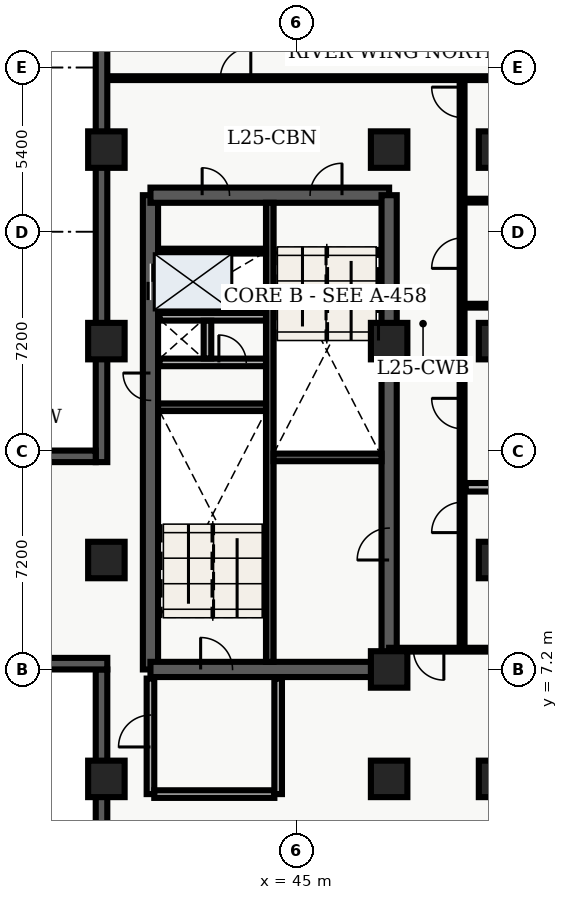
"""IFC4 building model, lengths in metres.
Left out: names, types, materials, properties, quantities, classifications, styles, units other than length and angle.
Written with IfcOpenShell. Run it as: python <this file> out.ifc"""

import sys

from ifc_helpers import new_model, entity, si_unit, converted_unit, direction, frame, origin_with_axes, origin_2d_with_axis, place, context, subcontext, project, spatial, polyline, rectangle, outline, extrude, element, fill, save


model = new_model("IFC4")
c1 = context("Model", 3, precision=1e-05, world=origin_with_axes(), true_north=direction((0.0, 1.0)))
c2 = subcontext(c1, "Body", "Model", "MODEL_VIEW")
j1 = project(units=[si_unit("LENGTHUNIT", "METRE"), converted_unit("PLANEANGLEUNIT", "DEGREE", entity("IfcPlaneAngleMeasure", 0.017), si_unit("PLANEANGLEUNIT", "RADIAN"), dimensions=[0, 0, 0, 0, 0, 0, 0])], contexts=[c1])
p1 = place(None, origin_with_axes())
s1 = spatial("IfcSite", under=j1, at=p1, CompositionType="ELEMENT")
p2 = place(p1, origin_with_axes())
s2 = spatial("IfcBuilding", under=s1, at=p2, CompositionType="ELEMENT")
p3 = place(p2, frame((0.0, 0.0, 104.7), z_axis=(0.0, 0.0, 1.0), x_axis=(1.0, 0.0, 0.0)))
s3 = spatial("IfcBuildingStorey", under=s2, at=p3, CompositionType="ELEMENT", Elevation=104.7)
p4 = place(p3, frame((40.2, 7.2, 0.0), z_axis=(0.0, 0.0, 1.0), x_axis=(0.0, 1.0, 0.0)))
e1 = element("IfcWall", 1, at=p4, inside=s3, PredefinedType="SHEAR", context=c2, shape_type="SweptSolid", body=[
    extrude(outline(polyline([(0.0, -0.25), (15.6, -0.25), (15.6, 0.25), (0.0, 0.25), (0.0, -0.25)])), origin_with_axes(), (0.0, 0.0, 1.0), 3.66),
])
p5 = place(p4, frame((12.75, 0.0, 0.0), z_axis=(0.0, 0.0, 1.0), x_axis=(1.0, 0.0, 0.0)))
e2 = element("IfcOpeningElement", 2, at=p5, cuts=e1, PredefinedType="OPENING", context=c2, shape_type="SweptSolid", body=[
    extrude(rectangle(XDim=1.2, YDim=0.52, at=origin_2d_with_axis()), origin_with_axes(), (0.0, 0.0, 1.0), 2.15),
])
p6 = place(p4, frame((9.3, 0.0, 0.0), z_axis=(0.0, 0.0, 1.0), x_axis=(1.0, 0.0, 0.0)))
e3 = element("IfcOpeningElement", 3, at=p6, cuts=e1, PredefinedType="OPENING", context=c2, shape_type="SweptSolid", body=[
    extrude(rectangle(XDim=0.9, YDim=0.52, at=origin_2d_with_axis()), origin_with_axes(), (0.0, 0.0, 1.0), 2.15),
])
p7 = place(p3, frame((40.2, 7.2, 0.0), z_axis=(0.0, 0.0, 1.0), x_axis=(1.0, 0.0, 0.0)))
e4 = element("IfcWall", 4, at=p7, inside=s3, PredefinedType="SHEAR", context=c2, shape_type="SweptSolid", body=[
    extrude(outline(polyline([(0.0, -0.25), (7.85, -0.25), (7.85, 0.25), (0.0, 0.25), (0.0, -0.25)])), origin_with_axes(), (0.0, 0.0, 1.0), 3.66),
])
p8 = place(p7, frame((2.175, 0.0, 0.0), z_axis=(0.0, 0.0, 1.0), x_axis=(1.0, 0.0, 0.0)))
e5 = element("IfcOpeningElement", 5, at=p8, cuts=e4, PredefinedType="OPENING", context=c2, shape_type="SweptSolid", body=[
    extrude(rectangle(XDim=1.05, YDim=0.52, at=origin_2d_with_axis()), origin_with_axes(), (0.0, 0.0, 1.0), 2.15),
])
p9 = place(p3, frame((40.2, 22.8, 0.0), z_axis=(0.0, 0.0, 1.0), x_axis=(1.0, 0.0, 0.0)))
e6 = element("IfcWall", 6, at=p9, inside=s3, PredefinedType="SHEAR", context=c2, shape_type="SweptSolid", body=[
    extrude(outline(polyline([(0.0, -0.25), (7.85, -0.25), (7.85, 0.25), (0.0, 0.25), (0.0, -0.25)])), origin_with_axes(), (0.0, 0.0, 1.0), 3.66),
])
p10 = place(p9, frame((5.775, 0.0, 0.0), z_axis=(0.0, 0.0, 1.0), x_axis=(1.0, 0.0, 0.0)))
e7 = element("IfcOpeningElement", 7, at=p10, cuts=e6, PredefinedType="OPENING", context=c2, shape_type="SweptSolid", body=[
    extrude(rectangle(XDim=1.05, YDim=0.52, at=origin_2d_with_axis()), origin_with_axes(), (0.0, 0.0, 1.0), 2.15),
])
p11 = place(p9, frame((2.15, 0.0, 0.0), z_axis=(0.0, 0.0, 1.0), x_axis=(1.0, 0.0, 0.0)))
e8 = element("IfcOpeningElement", 8, at=p11, cuts=e6, PredefinedType="OPENING", context=c2, shape_type="SweptSolid", body=[
    extrude(rectangle(XDim=0.9, YDim=0.52, at=origin_2d_with_axis()), origin_with_axes(), (0.0, 0.0, 1.0), 2.15),
])
p12 = place(p3, frame((48.05, 7.2, 0.0), z_axis=(0.0, 0.0, 1.0), x_axis=(0.0, 1.0, 0.0)))
e9 = element("IfcWall", 9, at=p12, inside=s3, PredefinedType="SHEAR", context=c2, shape_type="SweptSolid", body=[
    extrude(outline(polyline([(0.0, -0.25), (15.6, -0.25), (15.6, 0.25), (0.0, 0.25), (0.0, -0.25)])), origin_with_axes(), (0.0, 0.0, 1.0), 3.66),
])
p13 = place(p12, frame((4.125, 0.0, 0.0), z_axis=(0.0, 0.0, 1.0), x_axis=(1.0, 0.0, 0.0)))
e10 = element("IfcOpeningElement", 10, at=p13, cuts=e9, PredefinedType="OPENING", context=c2, shape_type="SweptSolid", body=[
    extrude(rectangle(XDim=1.05, YDim=0.52, at=origin_2d_with_axis()), origin_with_axes(), (0.0, 0.0, 1.0), 2.15),
])
p14 = place(p3, frame((44.125, 7.45, 0.0), z_axis=(0.0, 0.0, 1.0), x_axis=(0.0, 1.0, 0.0)))
e11 = element("IfcWall", 11, at=p14, inside=s3, PredefinedType="SHEAR", context=c2, shape_type="SweptSolid", body=[
    extrude(outline(polyline([(0.0, -0.125), (15.1, -0.125), (15.1, 0.125), (0.0, 0.125), (0.0, -0.125)])), origin_with_axes(), (0.0, 0.0, 1.0), 3.66),
])
for number, where, z_axis, x_axis in (
    (12, (40.45, 15.825, 0.0), (0.0, 0.0, 1.0), (1.0, 0.0, 0.0)),
    (13, (44.25, 14.175, 0.0), (0.0, 0.0, 1.0), (1.0, 0.0, 0.0)),
):
    element("IfcWall", number, at=place(p3, frame(where, z_axis=z_axis, x_axis=x_axis)), inside=s3, PredefinedType="SHEAR", context=c2, shape_type="SweptSolid", body=[
        extrude(outline(polyline([(0.0, -0.125), (3.55, -0.125), (3.55, 0.125), (0.0, 0.125), (0.0, -0.125)])), origin_with_axes(), (0.0, 0.0, 1.0), 3.66),
    ])
p15 = place(p3, frame((40.5, 17.3, 0.0), z_axis=(0.0, 0.0, 1.0), x_axis=(1.0, 0.0, 0.0)))
e14 = element("IfcWall", 14, at=p15, inside=s3, PredefinedType="SOLIDWALL", context=c2, shape_type="SweptSolid", body=[
    extrude(outline(polyline([(0.0, -0.125), (3.5, -0.125), (3.5, 0.125), (0.0, 0.125), (0.0, -0.125)])), origin_with_axes(), (0.0, 0.0, 1.0), 2.7),
])
p16 = place(p15, frame((2.4, 0.0, 0.0), z_axis=(0.0, 0.0, 1.0), x_axis=(1.0, 0.0, 0.0)))
e15 = element("IfcOpeningElement", 15, at=p16, cuts=e14, PredefinedType="OPENING", context=c2, shape_type="SweptSolid", body=[
    extrude(rectangle(XDim=0.9, YDim=0.27, at=origin_2d_with_axis()), origin_with_axes(), (0.0, 0.0, 1.0), 2.15),
])
p17 = place(p3, frame((40.5, 18.8, 0.0), z_axis=(0.0, 0.0, 1.0), x_axis=(1.0, 0.0, 0.0)))
e16 = element("IfcWall", 16, at=p17, inside=s3, PredefinedType="SOLIDWALL", context=c2, shape_type="SweptSolid", body=[
    extrude(outline(polyline([(0.0, -0.125), (3.5, -0.125), (3.5, 0.125), (0.0, 0.125), (0.0, -0.125)])), origin_with_axes(), (0.0, 0.0, 1.0), 2.7),
])
p18 = place(p3, frame((42.075, 17.43, 0.0), z_axis=(0.0, 0.0, 1.0), x_axis=(0.0, 1.0, 0.0)))
e17 = element("IfcWall", 17, at=p18, inside=s3, PredefinedType="SOLIDWALL", context=c2, shape_type="SweptSolid", body=[
    extrude(outline(polyline([(0.0, -0.125), (1.24, -0.125), (1.24, 0.125), (0.0, 0.125), (0.0, -0.125)])), origin_with_axes(), (0.0, 0.0, 1.0), 2.7),
])
p19 = place(p3, frame((40.2, 3.1, 0.0), z_axis=(0.0, 0.0, 1.0), x_axis=(0.0, 1.0, 0.0)))
e18 = element("IfcWall", 18, at=p19, inside=s3, PredefinedType="SOLIDWALL", context=c2, shape_type="SweptSolid", body=[
    extrude(outline(polyline([(0.0, -0.125), (3.8, -0.125), (3.8, 0.125), (0.0, 0.125), (0.0, -0.125)])), origin_with_axes(), (0.0, 0.0, 1.0), 2.7),
])
p20 = place(p19, frame((2.075, 0.0, 0.0), z_axis=(0.0, 0.0, 1.0), x_axis=(1.0, 0.0, 0.0)))
e19 = element("IfcOpeningElement", 19, at=p20, cuts=e18, PredefinedType="OPENING", context=c2, shape_type="SweptSolid", body=[
    extrude(rectangle(XDim=1.05, YDim=0.27, at=origin_2d_with_axis()), origin_with_axes(), (0.0, 0.0, 1.0), 2.15),
])
p21 = place(p3, frame((40.325, 3.1, 0.0), z_axis=(0.0, 0.0, 1.0), x_axis=(1.0, 0.0, 0.0)))
e20 = element("IfcWall", 20, at=p21, inside=s3, PredefinedType="SOLIDWALL", context=c2, shape_type="SweptSolid", body=[
    extrude(outline(polyline([(0.0, -0.125), (3.95, -0.125), (3.95, 0.125), (0.0, 0.125), (0.0, -0.125)])), origin_with_axes(), (0.0, 0.0, 1.0), 2.7),
])
p22 = place(p3, frame((44.4, 3.1, 0.0), z_axis=(0.0, 0.0, 1.0), x_axis=(0.0, 1.0, 0.0)))
e21 = element("IfcWall", 21, at=p22, inside=s3, PredefinedType="SOLIDWALL", context=c2, shape_type="SweptSolid", body=[
    extrude(outline(polyline([(0.0, -0.125), (3.8, -0.125), (3.8, 0.125), (0.0, 0.125), (0.0, -0.125)])), origin_with_axes(), (0.0, 0.0, 1.0), 2.7),
])
for number, where, z_axis, x_axis in (
    (22, (38.75, 3.6, 0.0), (0.0, 0.0, 1.0), (1.0, 0.0, 0.0)),
    (23, (38.75, 10.8, 0.0), (0.0, 0.0, 1.0), (1.0, 0.0, 0.0)),
    (24, (38.75, 18.0, 0.0), (0.0, 0.0, 1.0), (1.0, 0.0, 0.0)),
    (25, (38.75, 24.3, 0.0), (0.0, 0.0, 1.0), (1.0, 0.0, 0.0)),
    (26, (48.05, 3.6, 0.0), (0.0, 0.0, 1.0), (1.0, 0.0, 0.0)),
    (27, (48.05, 7.2, 0.0), (0.0, 0.0, 1.0), (1.0, 0.0, 0.0)),
    (28, (48.05, 18.0, 0.0), (0.0, 0.0, 1.0), (1.0, 0.0, 0.0)),
    (29, (48.05, 24.3, 0.0), (0.0, 0.0, 1.0), (1.0, 0.0, 0.0)),
    (30, (51.6, 3.6, 0.0), (0.0, 0.0, 1.0), (1.0, 0.0, 0.0)),
    (31, (51.6, 10.8, 0.0), (0.0, 0.0, 1.0), (1.0, 0.0, 0.0)),
    (32, (51.6, 18.0, 0.0), (0.0, 0.0, 1.0), (1.0, 0.0, 0.0)),
    (33, (51.6, 24.3, 0.0), (0.0, 0.0, 1.0), (1.0, 0.0, 0.0)),
):
    element("IfcColumn", number, at=place(p3, frame(where, z_axis=z_axis, x_axis=x_axis)), inside=s3, PredefinedType="COLUMN", context=c2, shape_type="SweptSolid", body=[
        extrude(rectangle(XDim=1.2, YDim=1.2, at=origin_2d_with_axis()), origin_with_axes(), (0.0, 0.0, 1.0), 3.9),
    ])
p23 = place(p3, frame((40.5, 20.96, 0.0), z_axis=(0.0, 0.0, 1.0), x_axis=(1.0, 0.0, 0.0)))
e34 = element("IfcWall", 34, at=p23, inside=s3, PredefinedType="PARTITIONING", context=c2, shape_type="SweptSolid", body=[
    extrude(outline(polyline([(0.0, -0.08), (3.5, -0.08), (3.5, 0.08), (0.0, 0.08), (0.0, -0.08)])), origin_with_axes(), (0.0, 0.0, 1.0), 2.7),
])
p24 = place(p3, frame((50.45, 7.85, 0.0), z_axis=(0.0, 0.0, 1.0), x_axis=(0.0, 1.0, 0.0)))
e35 = element("IfcWall", 35, at=p24, inside=s3, PredefinedType="PARTITIONING", context=c2, shape_type="SweptSolid", body=[
    extrude(outline(polyline([(0.0, -0.08), (18.8, -0.08), (18.8, 0.08), (0.0, 0.08), (0.0, -0.08)])), origin_with_axes(), (0.0, 0.0, 1.0), 2.7),
])
p25 = place(p24, frame((4.351, 0.0, 0.0), z_axis=(0.0, 0.0, 1.0), x_axis=(1.0, 0.0, 0.0)))
e36 = element("IfcOpeningElement", 36, at=p25, cuts=e35, PredefinedType="OPENING", context=c2, shape_type="SweptSolid", body=[
    extrude(rectangle(XDim=1.0, YDim=0.18, at=origin_2d_with_axis()), origin_with_axes(), (0.0, 0.0, 1.0), 2.15),
])
p26 = place(p24, frame((7.768, 0.0, 0.0), z_axis=(0.0, 0.0, 1.0), x_axis=(1.0, 0.0, 0.0)))
e37 = element("IfcOpeningElement", 37, at=p26, cuts=e35, PredefinedType="OPENING", context=c2, shape_type="SweptSolid", body=[
    extrude(rectangle(XDim=1.0, YDim=0.18, at=origin_2d_with_axis()), origin_with_axes(), (0.0, 0.0, 1.0), 2.15),
])
p27 = place(p24, frame((13.043, 0.0, 0.0), z_axis=(0.0, 0.0, 1.0), x_axis=(1.0, 0.0, 0.0)))
e38 = element("IfcOpeningElement", 38, at=p27, cuts=e35, PredefinedType="OPENING", context=c2, shape_type="SweptSolid", body=[
    extrude(rectangle(XDim=1.0, YDim=0.18, at=origin_2d_with_axis()), origin_with_axes(), (0.0, 0.0, 1.0), 2.15),
])
p28 = place(p24, frame((18.005, 0.0, 0.0), z_axis=(0.0, 0.0, 1.0), x_axis=(1.0, 0.0, 0.0)))
e39 = element("IfcOpeningElement", 39, at=p28, cuts=e35, PredefinedType="OPENING", context=c2, shape_type="SweptSolid", body=[
    extrude(rectangle(XDim=1.0, YDim=0.18, at=origin_2d_with_axis()), origin_with_axes(), (0.0, 0.0, 1.0), 2.15),
])
p29 = place(p3, frame((59.64, 7.85, 0.0), z_axis=(0.0, 0.0, 1.0), x_axis=(-1.0, 0.0, 0.0)))
e40 = element("IfcWall", 40, at=p29, inside=s3, PredefinedType="PARTITIONING", context=c2, shape_type="SweptSolid", body=[
    extrude(outline(polyline([(0.0, -0.062), (11.59, -0.062), (11.59, 0.062), (0.0, 0.062), (0.0, -0.062)])), origin_with_axes(), (0.0, 0.0, 1.0), 2.7),
])
p30 = place(p29, frame((10.29, 0.0, 0.0), z_axis=(0.0, 0.0, 1.0), x_axis=(1.0, 0.0, 0.0)))
e41 = element("IfcOpeningElement", 41, at=p30, cuts=e40, PredefinedType="OPENING", context=c2, shape_type="SweptSolid", body=[
    extrude(rectangle(XDim=1.0, YDim=0.145, at=origin_2d_with_axis()), origin_with_axes(), (0.0, 0.0, 1.0), 2.15),
])
p31 = place(p3, frame((38.76, 26.65, 0.0), z_axis=(0.0, 0.0, 1.0), x_axis=(1.0, 0.0, 0.0)))
e42 = element("IfcWall", 42, at=p31, inside=s3, PredefinedType="PARTITIONING", context=c2, shape_type="SweptSolid", body=[
    extrude(outline(polyline([(0.0, -0.062), (20.88, -0.062), (20.88, 0.062), (0.0, 0.062), (0.0, -0.062)])), origin_with_axes(), (0.0, 0.0, 1.0), 2.7),
])
p32 = place(p31, frame((4.24, 0.0, 0.0), z_axis=(0.0, 0.0, 1.0), x_axis=(1.0, 0.0, 0.0)))
e43 = element("IfcOpeningElement", 43, at=p32, cuts=e42, PredefinedType="OPENING", context=c2, shape_type="SweptSolid", body=[
    extrude(rectangle(XDim=1.0, YDim=0.145, at=origin_2d_with_axis()), origin_with_axes(), (0.0, 0.0, 1.0), 2.15),
])
p33 = place(p3, frame((50.57, 13.192, 0.0), z_axis=(0.0, 0.0, 1.0), x_axis=(1.0, 0.0, 0.0)))
e44 = element("IfcWall", 44, at=p33, inside=s3, PredefinedType="PARTITIONING", context=c2, shape_type="SweptSolid", body=[
    extrude(outline(polyline([(0.0, -0.14), (9.055, -0.14), (9.055, 0.14), (0.0, 0.14), (0.0, -0.14)])), origin_with_axes(), (0.0, 0.0, 1.0), 2.7),
])
for number, where, z_axis, x_axis in (
    (45, (50.57, 19.165, 0.0), (0.0, 0.0, 1.0), (1.0, 0.0, 0.0)),
    (46, (50.57, 22.621, 0.0), (0.0, 0.0, 1.0), (1.0, 0.0, 0.0)),
):
    element("IfcWall", number, at=place(p3, frame(where, z_axis=z_axis, x_axis=x_axis)), inside=s3, PredefinedType="PARTITIONING", context=c2, shape_type="SweptSolid", body=[
        extrude(outline(polyline([(0.0, -0.062), (9.055, -0.062), (9.055, 0.062), (0.0, 0.062), (0.0, -0.062)])), origin_with_axes(), (0.0, 0.0, 1.0), 2.7),
    ])
p34 = place(p3, frame((38.59, 14.02, 0.0), z_axis=(0.0, 0.0, 1.0), x_axis=(0.0, 1.0, 0.0)))
e47 = element("IfcWall", 47, at=p34, inside=s3, PredefinedType="SOLIDWALL", context=c2, shape_type="SweptSolid", body=[
    extrude(outline(polyline([(0.0, -0.19), (14.78, -0.19), (14.78, 0.19), (0.0, 0.19), (0.0, -0.19)])), origin_with_axes(), (0.0, 0.0, 1.0), 3.66),
])
p35 = place(p3, frame((38.59, 0.38, 0.0), z_axis=(0.0, 0.0, 1.0), x_axis=(0.0, 1.0, 0.0)))
e48 = element("IfcWall", 48, at=p35, inside=s3, PredefinedType="SOLIDWALL", context=c2, shape_type="SweptSolid", body=[
    extrude(outline(polyline([(0.0, -0.19), (6.82, -0.19), (6.82, 0.19), (0.0, 0.19), (0.0, -0.19)])), origin_with_axes(), (0.0, 0.0, 1.0), 3.66),
])
p36 = place(p3, frame((38.78, 7.39, 0.0), z_axis=(0.0, 0.0, 1.0), x_axis=(-1.0, 0.0, 0.0)))
e49 = element("IfcWall", 49, at=p36, inside=s3, PredefinedType="SOLIDWALL", context=c2, shape_type="SweptSolid", body=[
    extrude(outline(polyline([(0.0, -0.19), (17.18, -0.19), (17.18, 0.19), (0.0, 0.19), (0.0, -0.19)])), origin_with_axes(), (0.0, 0.0, 1.0), 3.66),
])
p37 = place(p36, frame((4.113, 0.0, 0.45), z_axis=(0.0, 0.0, 1.0), x_axis=(1.0, 0.0, 0.0)))
e50 = element("IfcOpeningElement", 50, at=p37, cuts=e49, PredefinedType="OPENING", context=c2, shape_type="SweptSolid", body=[
    extrude(rectangle(XDim=2.1, YDim=0.4, at=origin_2d_with_axis()), origin_with_axes(), (0.0, 0.0, 1.0), 2.2),
])
p38 = place(p36, frame((8.59, 0.0, 0.45), z_axis=(0.0, 0.0, 1.0), x_axis=(1.0, 0.0, 0.0)))
e51 = element("IfcOpeningElement", 51, at=p38, cuts=e49, PredefinedType="OPENING", context=c2, shape_type="SweptSolid", body=[
    extrude(rectangle(XDim=2.1, YDim=0.4, at=origin_2d_with_axis()), origin_with_axes(), (0.0, 0.0, 1.0), 2.2),
])
p39 = place(p36, frame((13.917, 0.0, 0.45), z_axis=(0.0, 0.0, 1.0), x_axis=(1.0, 0.0, 0.0)))
e52 = element("IfcOpeningElement", 52, at=p39, cuts=e49, PredefinedType="OPENING", context=c2, shape_type="SweptSolid", body=[
    extrude(rectangle(XDim=2.1, YDim=0.4, at=origin_2d_with_axis()), origin_with_axes(), (0.0, 0.0, 1.0), 2.2),
])
p40 = place(p3, frame((21.22, 14.21, 0.0), z_axis=(0.0, 0.0, 1.0), x_axis=(1.0, 0.0, 0.0)))
e53 = element("IfcWall", 53, at=p40, inside=s3, PredefinedType="SOLIDWALL", context=c2, shape_type="SweptSolid", body=[
    extrude(outline(polyline([(0.0, -0.19), (17.18, -0.19), (17.18, 0.19), (0.0, 0.19), (0.0, -0.19)])), origin_with_axes(), (0.0, 0.0, 1.0), 3.66),
])
p41 = place(p40, frame((3.263, 0.0, 0.45), z_axis=(0.0, 0.0, 1.0), x_axis=(1.0, 0.0, 0.0)))
e54 = element("IfcOpeningElement", 54, at=p41, cuts=e53, PredefinedType="OPENING", context=c2, shape_type="SweptSolid", body=[
    extrude(rectangle(XDim=2.1, YDim=0.4, at=origin_2d_with_axis()), origin_with_axes(), (0.0, 0.0, 1.0), 2.2),
])
p42 = place(p40, frame((8.59, 0.0, 0.45), z_axis=(0.0, 0.0, 1.0), x_axis=(1.0, 0.0, 0.0)))
e55 = element("IfcOpeningElement", 55, at=p42, cuts=e53, PredefinedType="OPENING", context=c2, shape_type="SweptSolid", body=[
    extrude(rectangle(XDim=2.1, YDim=0.4, at=origin_2d_with_axis()), origin_with_axes(), (0.0, 0.0, 1.0), 2.2),
])
p43 = place(p40, frame((13.467, 0.0, 0.45), z_axis=(0.0, 0.0, 1.0), x_axis=(1.0, 0.0, 0.0)))
e56 = element("IfcOpeningElement", 56, at=p43, cuts=e53, PredefinedType="OPENING", context=c2, shape_type="SweptSolid", body=[
    extrude(rectangle(XDim=2.1, YDim=0.4, at=origin_2d_with_axis()), origin_with_axes(), (0.0, 0.0, 1.0), 2.2),
])
p44 = place(p4, frame((12.75, 0.0, 0.0), z_axis=(0.0, 0.0, 1.0), x_axis=(1.0, 0.0, 0.0)))
e57 = element("IfcDoor", 57, at=p44, inside=s3, OperationType="DOUBLE_DOOR_SLIDING", PredefinedType="DOOR", context=c2, shape_type="SweptSolid", body=[
    extrude(rectangle(XDim=1.2, YDim=0.09, at=origin_2d_with_axis()), origin_with_axes(), (0.0, 0.0, 1.0), 2.15),
])
fill(e2, e57)
p45 = place(p4, frame((9.3, 0.0, 0.0), z_axis=(0.0, 0.0, 1.0), x_axis=(1.0, 0.0, 0.0)))
e58 = element("IfcDoor", 58, at=p45, inside=s3, OperationType="SINGLE_SWING_RIGHT", PredefinedType="DOOR", context=c2, shape_type="SweptSolid", body=[
    extrude(rectangle(XDim=0.9, YDim=0.09, at=origin_2d_with_axis()), origin_with_axes(), (0.0, 0.0, 1.0), 2.15),
])
fill(e3, e58)
p46 = place(p15, frame((2.4, 0.0, 0.0), z_axis=(0.0, 0.0, 1.0), x_axis=(1.0, 0.0, 0.0)))
e59 = element("IfcDoor", 59, at=p46, inside=s3, OperationType="SINGLE_SWING_LEFT", PredefinedType="DOOR", context=c2, shape_type="SweptSolid", body=[
    extrude(rectangle(XDim=0.9, YDim=0.09, at=origin_2d_with_axis()), origin_with_axes(), (0.0, 0.0, 1.0), 2.15),
])
fill(e15, e59)
p47 = place(p7, frame((2.175, 0.0, 0.0), z_axis=(0.0, 0.0, 1.0), x_axis=(1.0, 0.0, 0.0)))
e60 = element("IfcDoor", 60, at=p47, inside=s3, OperationType="SINGLE_SWING_LEFT", PredefinedType="DOOR", context=c2, shape_type="SweptSolid", body=[
    extrude(rectangle(XDim=1.05, YDim=0.09, at=origin_2d_with_axis()), origin_with_axes(), (0.0, 0.0, 1.0), 2.15),
])
fill(e5, e60)
p48 = place(p9, frame((5.775, 0.0, 0.0), z_axis=(0.0, 0.0, 1.0), x_axis=(1.0, 0.0, 0.0)))
e61 = element("IfcDoor", 61, at=p48, inside=s3, OperationType="SINGLE_SWING_RIGHT", PredefinedType="DOOR", context=c2, shape_type="SweptSolid", body=[
    extrude(rectangle(XDim=1.05, YDim=0.09, at=origin_2d_with_axis()), origin_with_axes(), (0.0, 0.0, 1.0), 2.15),
])
fill(e7, e61)
p49 = place(p19, frame((2.075, 0.0, 0.0), z_axis=(0.0, 0.0, 1.0), x_axis=(1.0, 0.0, 0.0)))
e62 = element("IfcDoor", 62, at=p49, inside=s3, OperationType="SINGLE_SWING_LEFT", PredefinedType="DOOR", context=c2, shape_type="SweptSolid", body=[
    extrude(rectangle(XDim=1.05, YDim=0.09, at=origin_2d_with_axis()), origin_with_axes(), (0.0, 0.0, 1.0), 2.15),
])
fill(e19, e62)
p50 = place(p9, frame((2.15, 0.0, 0.0), z_axis=(0.0, 0.0, 1.0), x_axis=(1.0, 0.0, 0.0)))
e63 = element("IfcDoor", 63, at=p50, inside=s3, OperationType="SINGLE_SWING_LEFT", PredefinedType="DOOR", context=c2, shape_type="SweptSolid", body=[
    extrude(rectangle(XDim=0.9, YDim=0.09, at=origin_2d_with_axis()), origin_with_axes(), (0.0, 0.0, 1.0), 2.15),
])
fill(e8, e63)
p51 = place(p12, frame((4.125, 0.0, 0.0), z_axis=(0.0, 0.0, 1.0), x_axis=(1.0, 0.0, 0.0)))
e64 = element("IfcDoor", 64, at=p51, inside=s3, OperationType="SINGLE_SWING_LEFT", PredefinedType="DOOR", context=c2, shape_type="SweptSolid", body=[
    extrude(rectangle(XDim=1.05, YDim=0.09, at=origin_2d_with_axis()), origin_with_axes(), (0.0, 0.0, 1.0), 2.15),
])
fill(e10, e64)
p52 = place(p29, frame((10.29, 0.0, 0.0), z_axis=(0.0, 0.0, 1.0), x_axis=(1.0, 0.0, 0.0)))
e65 = element("IfcDoor", 65, at=p52, inside=s3, OperationType="SINGLE_SWING_LEFT", PredefinedType="DOOR", context=c2, shape_type="SweptSolid", body=[
    extrude(rectangle(XDim=1.0, YDim=0.075, at=origin_2d_with_axis()), origin_with_axes(), (0.0, 0.0, 1.0), 2.15),
])
fill(e41, e65)
p53 = place(p31, frame((4.24, 0.0, 0.0), z_axis=(0.0, 0.0, 1.0), x_axis=(1.0, 0.0, 0.0)))
e66 = element("IfcDoor", 66, at=p53, inside=s3, OperationType="SINGLE_SWING_RIGHT", PredefinedType="DOOR", context=c2, shape_type="SweptSolid", body=[
    extrude(rectangle(XDim=1.0, YDim=0.075, at=origin_2d_with_axis()), origin_with_axes(), (0.0, 0.0, 1.0), 2.15),
])
fill(e43, e66)
p54 = place(p24, frame((4.351, 0.0, 0.0), z_axis=(0.0, 0.0, 1.0), x_axis=(1.0, 0.0, 0.0)))
e67 = element("IfcDoor", 67, at=p54, inside=s3, OperationType="SINGLE_SWING_LEFT", PredefinedType="DOOR", context=c2, shape_type="SweptSolid", body=[
    extrude(rectangle(XDim=1.0, YDim=0.09, at=origin_2d_with_axis()), origin_with_axes(), (0.0, 0.0, 1.0), 2.15),
])
fill(e36, e67)
p55 = place(p24, frame((7.768, 0.0, 0.0), z_axis=(0.0, 0.0, 1.0), x_axis=(1.0, 0.0, 0.0)))
e68 = element("IfcDoor", 68, at=p55, inside=s3, OperationType="SINGLE_SWING_RIGHT", PredefinedType="DOOR", context=c2, shape_type="SweptSolid", body=[
    extrude(rectangle(XDim=1.0, YDim=0.09, at=origin_2d_with_axis()), origin_with_axes(), (0.0, 0.0, 1.0), 2.15),
])
fill(e37, e68)
p56 = place(p24, frame((13.043, 0.0, 0.0), z_axis=(0.0, 0.0, 1.0), x_axis=(1.0, 0.0, 0.0)))
e69 = element("IfcDoor", 69, at=p56, inside=s3, OperationType="SINGLE_SWING_LEFT", PredefinedType="DOOR", context=c2, shape_type="SweptSolid", body=[
    extrude(rectangle(XDim=1.0, YDim=0.09, at=origin_2d_with_axis()), origin_with_axes(), (0.0, 0.0, 1.0), 2.15),
])
fill(e38, e69)
p57 = place(p24, frame((18.005, 0.0, 0.0), z_axis=(0.0, 0.0, 1.0), x_axis=(1.0, 0.0, 0.0)))
e70 = element("IfcDoor", 70, at=p57, inside=s3, OperationType="SINGLE_SWING_RIGHT", PredefinedType="DOOR", context=c2, shape_type="SweptSolid", body=[
    extrude(rectangle(XDim=1.0, YDim=0.09, at=origin_2d_with_axis()), origin_with_axes(), (0.0, 0.0, 1.0), 2.15),
])
fill(e39, e70)
save(model, sys.argv[1])
